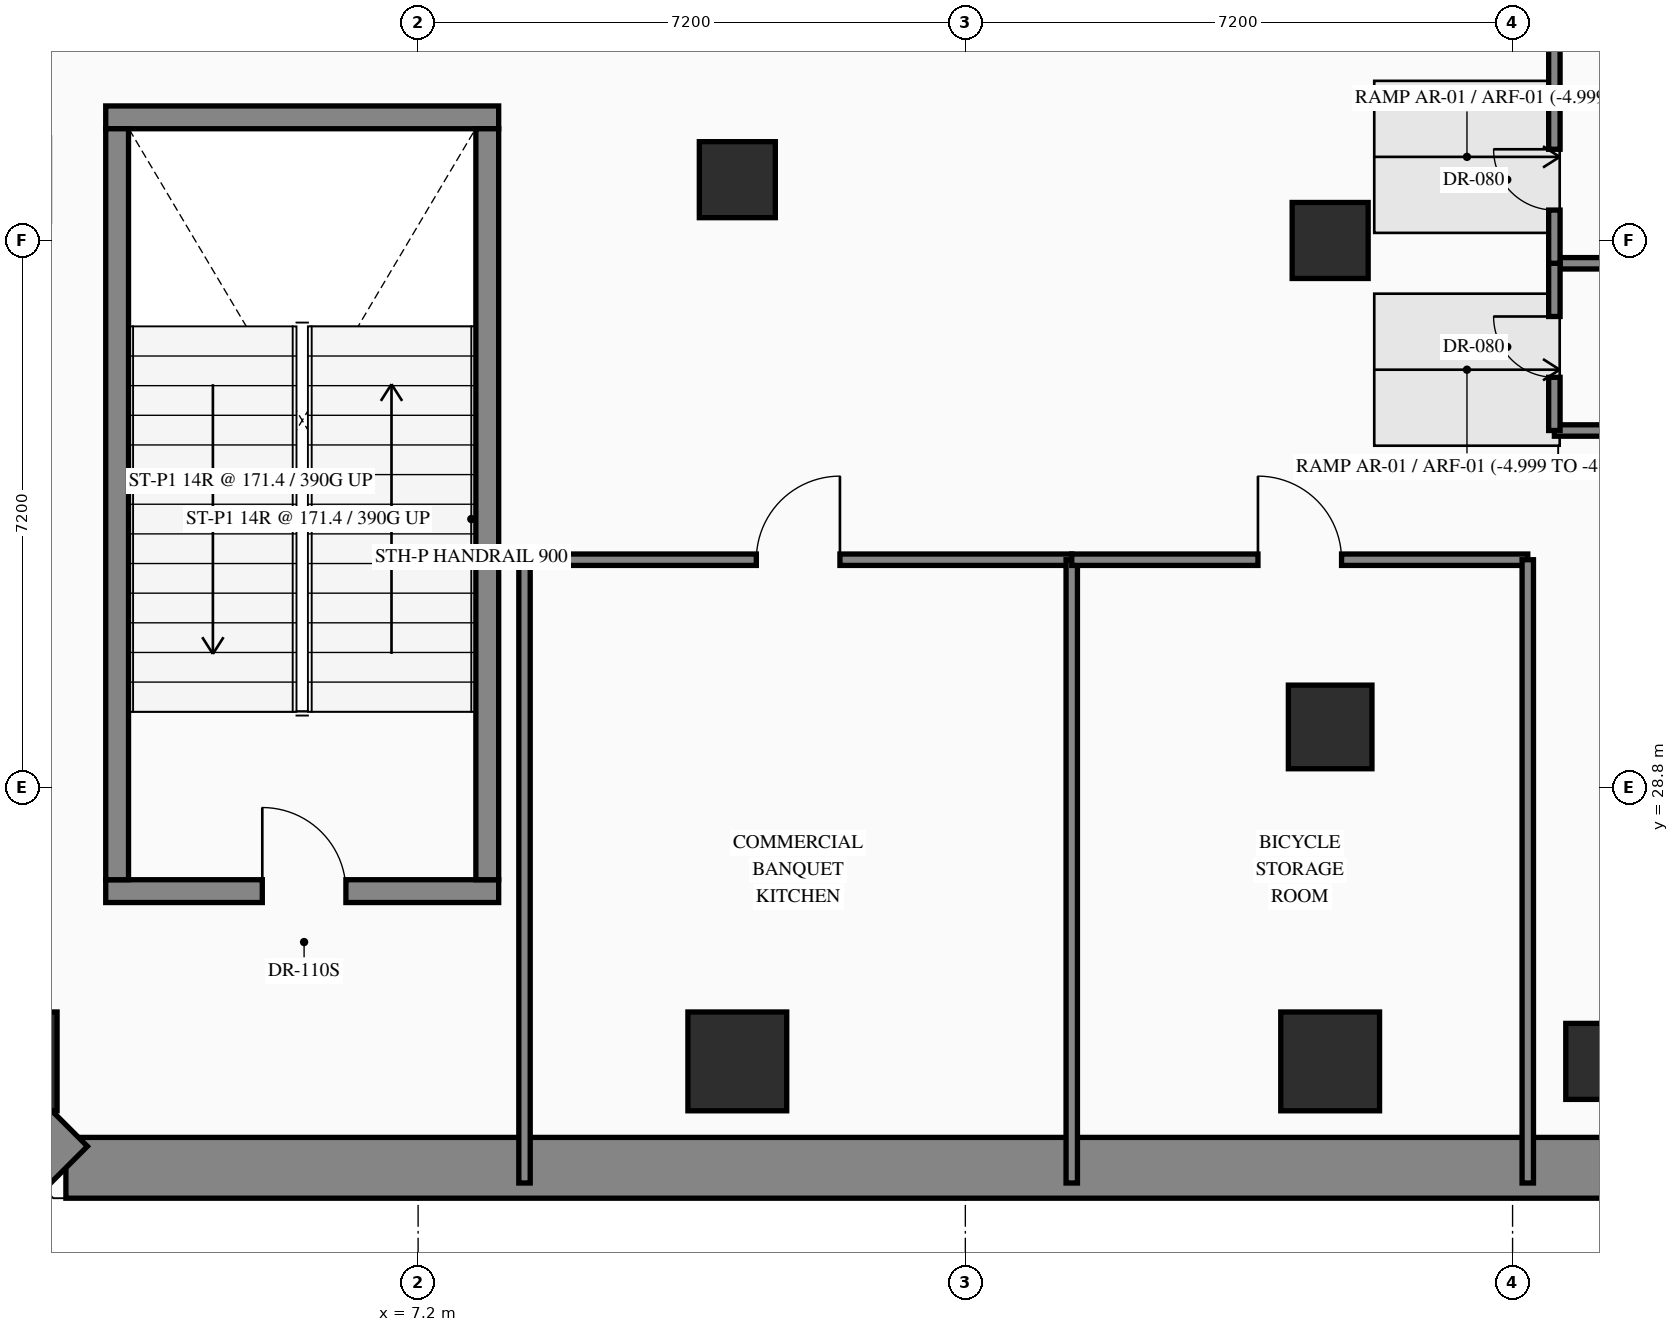
"""IFC4 building model, lengths in metres.
Left out: names, types, materials, properties, quantities, classifications, styles, units other than length and angle.
Written with IfcOpenShell. Run it as: python <this file> out.ifc"""

import sys

from ifc_helpers import new_model, si_unit, direction, frame, frame_2d, origin, origin_2d, place, context, subcontext, project, spatial, rectangle, hollow_rectangle, extrude, element, fill, save


model = new_model("IFC4")
c1 = context("Model", 3, precision=1e-05, world=origin(), true_north=direction((0.0, 1.0)))
c2 = subcontext(c1, "Body", "Model", "MODEL_VIEW")
j1 = project(units=[si_unit("LENGTHUNIT", "METRE"), si_unit("PLANEANGLEUNIT", "RADIAN")], contexts=[c1])
p1 = place(None, origin())
s1 = spatial("IfcSite", under=j1, at=p1, CompositionType="ELEMENT")
p2 = place(p1, origin())
s2 = spatial("IfcBuilding", under=s1, at=p2, CompositionType="ELEMENT")
p3 = place(p2, frame((0.0, 0.0, -4.8)))
s3 = spatial("IfcBuildingStorey", under=s2, at=p3, CompositionType="ELEMENT", Elevation=-4.8)
p4 = place(p3, frame((3.09, 27.44, 0.0), z_axis=(0.0, 0.0, 1.0), x_axis=(1.0, 0.0, 0.0)))
e1 = element("IfcWall", 1, at=p4, inside=s3, PredefinedType="SHEAR", context=c2, shape_type="SweptSolid", body=[
    extrude(rectangle(XDim=5.17, YDim=0.3, at=frame_2d((2.585, 0.0))), origin(), (0.0, 0.0, 1.0), 4.8),
])
p5 = place(p4, frame((2.06, 0.0, 0.0)))
e2 = element("IfcOpeningElement", 2, at=p5, cuts=e1, PredefinedType="OPENING", context=c2, shape_type="SweptSolid", body=[
    extrude(rectangle(XDim=1.1, YDim=2.2, at=frame_2d((0.55, 1.1))), frame((0.0, 0.16, 0.0), z_axis=(0.0, -1.0, 0.0), x_axis=(1.0, 0.0, 0.0)), (0.0, 0.0, 1.0), 0.32),
])
p6 = place(p3, frame((3.09, 37.62, 0.0), z_axis=(0.0, 0.0, 1.0), x_axis=(1.0, 0.0, 0.0)))
e3 = element("IfcWall", 3, at=p6, inside=s3, PredefinedType="SHEAR", context=c2, shape_type="SweptSolid", body=[
    extrude(rectangle(XDim=5.17, YDim=0.3, at=frame_2d((2.585, 0.0))), origin(), (0.0, 0.0, 1.0), 4.8),
])
for number, where, z_axis, x_axis in (
    (4, (3.24, 27.59, 0.0), (0.0, 0.0, 1.0), (0.0, 1.0, 0.0)),
    (5, (8.11, 27.59, 0.0), (0.0, 0.0, 1.0), (0.0, 1.0, 0.0)),
):
    element("IfcWall", number, at=place(p3, frame(where, z_axis=z_axis, x_axis=x_axis)), inside=s3, PredefinedType="SHEAR", context=c2, shape_type="SweptSolid", body=[
        extrude(rectangle(XDim=9.88, YDim=0.3, at=frame_2d((4.94, 0.0))), origin(), (0.0, 0.0, 1.0), 4.8),
    ])
p7 = place(p3, frame((25.333, 23.8, 0.0), z_axis=(0.0, 0.0, 1.0), x_axis=(-1.0, 0.0, 0.0)))
e6 = element("IfcWall", 6, at=p7, inside=s3, PredefinedType="SHEAR", context=c2, shape_type="SweptSolid", body=[
    extrude(rectangle(XDim=22.767, YDim=0.8, at=frame_2d((11.384, 0.0))), origin(), (0.0, 0.0, 1.0), 4.5),
])
p8 = place(p3, frame((2.566, 23.8, 0.0), z_axis=(0.0, 0.0, 1.0), x_axis=(-0.707106781187, 0.707106781187, 0.0)))
e7 = element("IfcWall", 7, at=p8, inside=s3, PredefinedType="SHEAR", context=c2, shape_type="SweptSolid", body=[
    extrude(rectangle(XDim=3.063, YDim=0.8, at=frame_2d((1.532, 0.0))), origin(), (0.0, 0.0, 1.0), 4.5),
])
for number, where, z_axis, x_axis in (
    (8, (1.8, 25.2, 0.0), (0.0, 0.0, 1.0), (1.0, 0.0, 0.0)),
    (9, (11.4, 25.2, 0.0), (0.0, 0.0, 1.0), (1.0, 0.0, 0.0)),
    (10, (19.2, 25.2, 0.0), (0.0, 0.0, 1.0), (1.0, 0.0, 0.0)),
):
    element("IfcColumn", number, at=place(p3, frame(where, z_axis=z_axis, x_axis=x_axis)), inside=s3, PredefinedType="COLUMN", context=c2, shape_type="SweptSolid", body=[
        extrude(rectangle(XDim=1.3, YDim=1.3, at=origin_2d()), origin(), (0.0, 0.0, 1.0), 4.8),
    ])
p9 = place(p3, frame((19.2, 29.6, 0.0), z_axis=(0.0, 0.0, 1.0), x_axis=(1.0, 0.0, 0.0)))
e11 = element("IfcColumn", 11, at=p9, inside=s3, PredefinedType="COLUMN", context=c2, shape_type="SweptSolid", body=[
    extrude(hollow_rectangle(XDim=1.1, YDim=1.1, WallThickness=0.04, at=origin_2d()), origin(), (0.0, 0.0, 1.0), 4.8),
])
p10 = place(p3, frame((22.8, 25.2, 0.0), z_axis=(0.0, 0.0, 1.0), x_axis=(1.0, 0.0, 0.0)))
e12 = element("IfcColumn", 12, at=p10, inside=s3, PredefinedType="COLUMN", context=c2, shape_type="SweptSolid", body=[
    extrude(hollow_rectangle(XDim=1.0, YDim=1.0, WallThickness=0.038, at=origin_2d()), origin(), (0.0, 0.0, 1.0), 4.8),
])
for number, where, z_axis, x_axis in (
    (13, (11.4, 36.8, 0.0), (0.0, 0.0, 1.0), (1.0, 0.0, 0.0)),
    (14, (19.2, 36.0, 0.0), (0.0, 0.0, 1.0), (1.0, 0.0, 0.0)),
):
    element("IfcColumn", number, at=place(p3, frame(where, z_axis=z_axis, x_axis=x_axis)), inside=s3, PredefinedType="COLUMN", context=c2, shape_type="SweptSolid", body=[
        extrude(hollow_rectangle(XDim=1.0, YDim=1.0, WallThickness=0.038, at=origin_2d()), origin(), (0.0, 0.0, 1.0), 4.468),
    ])
for number, where, z_axis, x_axis in (
    (15, (22.15, 33.5, 0.0), (0.0, 0.0, 1.0), (1.0, 0.0, 0.0)),
    (16, (22.15, 35.7, 0.0), (0.0, 0.0, 1.0), (1.0, 0.0, 0.0)),
    (17, (22.15, 37.9, 0.0), (0.0, 0.0, 1.0), (1.0, 0.0, 0.0)),
):
    element("IfcWall", number, at=place(p3, frame(where, z_axis=z_axis, x_axis=x_axis)), inside=s3, PredefinedType="PARTITIONING", context=c2, shape_type="SweptSolid", body=[
        extrude(rectangle(XDim=3.3, YDim=0.15, at=frame_2d((1.65, 0.0))), origin(), (0.0, 0.0, 1.0), 4.5),
    ])
p11 = place(p3, frame((22.15, 33.5, 0.0), z_axis=(0.0, 0.0, 1.0), x_axis=(0.0, 1.0, 0.0)))
e18 = element("IfcWall", 18, at=p11, inside=s3, PredefinedType="PARTITIONING", context=c2, shape_type="SweptSolid", body=[
    extrude(rectangle(XDim=2.2, YDim=0.15, at=frame_2d((1.1, 0.0))), origin(), (0.0, 0.0, 1.0), 4.5),
])
p12 = place(p11, frame((0.7, 0.0, 0.0)))
e19 = element("IfcOpeningElement", 19, at=p12, cuts=e18, PredefinedType="OPENING", context=c2, shape_type="SweptSolid", body=[
    extrude(rectangle(XDim=0.8, YDim=2.06, at=frame_2d((0.4, 1.03))), frame((0.0, 0.085, 0.0), z_axis=(0.0, -1.0, 0.0), x_axis=(1.0, 0.0, 0.0)), (0.0, 0.0, 1.0), 0.17),
])
p13 = place(p3, frame((22.15, 35.7, 0.0), z_axis=(0.0, 0.0, 1.0), x_axis=(0.0, 1.0, 0.0)))
e20 = element("IfcWall", 20, at=p13, inside=s3, PredefinedType="PARTITIONING", context=c2, shape_type="SweptSolid", body=[
    extrude(rectangle(XDim=2.2, YDim=0.15, at=frame_2d((1.1, 0.0))), origin(), (0.0, 0.0, 1.0), 4.5),
])
p14 = place(p13, frame((0.7, 0.0, 0.0)))
e21 = element("IfcOpeningElement", 21, at=p14, cuts=e20, PredefinedType="OPENING", context=c2, shape_type="SweptSolid", body=[
    extrude(rectangle(XDim=0.8, YDim=2.06, at=frame_2d((0.4, 1.03))), frame((0.0, 0.085, 0.0), z_axis=(0.0, -1.0, 0.0), x_axis=(1.0, 0.0, 0.0)), (0.0, 0.0, 1.0), 0.17),
])
p15 = place(p3, frame((22.15, 37.9, 0.0), z_axis=(0.0, 0.0, 1.0), x_axis=(0.0, 1.0, 0.0)))
e22 = element("IfcWall", 22, at=p15, inside=s3, PredefinedType="PARTITIONING", context=c2, shape_type="SweptSolid", body=[
    extrude(rectangle(XDim=2.13, YDim=0.15, at=frame_2d((1.065, 0.0))), origin(), (0.0, 0.0, 1.0), 4.5),
])
p16 = place(p15, frame((0.665, 0.0, 0.0)))
e23 = element("IfcOpeningElement", 23, at=p16, cuts=e22, PredefinedType="OPENING", context=c2, shape_type="SweptSolid", body=[
    extrude(rectangle(XDim=0.8, YDim=2.06, at=frame_2d((0.4, 1.03))), frame((0.0, 0.085, 0.0), z_axis=(0.0, -1.0, 0.0), x_axis=(1.0, 0.0, 0.0)), (0.0, 0.0, 1.0), 0.17),
])
p17 = place(p3, frame((8.6, 31.8, 0.0), z_axis=(0.0, 0.0, 1.0), x_axis=(1.0, 0.0, 0.0)))
e24 = element("IfcWall", 24, at=p17, inside=s3, PredefinedType="PARTITIONING", context=c2, shape_type="SweptSolid", body=[
    extrude(rectangle(XDim=7.2, YDim=0.15, at=frame_2d((3.6, 0.0))), origin(), (0.0, 0.0, 1.0), 4.5),
])
p18 = place(p17, frame((3.05, 0.0, 0.0)))
e25 = element("IfcOpeningElement", 25, at=p18, cuts=e24, PredefinedType="OPENING", context=c2, shape_type="SweptSolid", body=[
    extrude(rectangle(XDim=1.1, YDim=2.24, at=frame_2d((0.55, 1.12))), frame((0.0, 0.085, 0.0), z_axis=(0.0, -1.0, 0.0), x_axis=(1.0, 0.0, 0.0)), (0.0, 0.0, 1.0), 0.17),
])
for number, where, z_axis, x_axis in (
    (26, (8.6, 23.6, 0.0), (0.0, 0.0, 1.0), (0.0, 1.0, 0.0)),
    (27, (15.8, 23.6, 0.0), (0.0, 0.0, 1.0), (0.0, 1.0, 0.0)),
):
    element("IfcWall", number, at=place(p3, frame(where, z_axis=z_axis, x_axis=x_axis)), inside=s3, PredefinedType="PARTITIONING", context=c2, shape_type="SweptSolid", body=[
        extrude(rectangle(XDim=8.2, YDim=0.15, at=frame_2d((4.1, 0.0))), origin(), (0.0, 0.0, 1.0), 4.5),
    ])
p19 = place(p3, frame((15.8, 31.8, 0.0), z_axis=(0.0, 0.0, 1.0), x_axis=(1.0, 0.0, 0.0)))
e28 = element("IfcWall", 28, at=p19, inside=s3, PredefinedType="PARTITIONING", context=c2, shape_type="SweptSolid", body=[
    extrude(rectangle(XDim=6.0, YDim=0.15, at=frame_2d((3.0, 0.0))), origin(), (0.0, 0.0, 1.0), 4.5),
])
p20 = place(p19, frame((2.45, 0.0, 0.0)))
e29 = element("IfcOpeningElement", 29, at=p20, cuts=e28, PredefinedType="OPENING", context=c2, shape_type="SweptSolid", body=[
    extrude(rectangle(XDim=1.1, YDim=2.24, at=frame_2d((0.55, 1.12))), frame((0.0, 0.085, 0.0), z_axis=(0.0, -1.0, 0.0), x_axis=(1.0, 0.0, 0.0)), (0.0, 0.0, 1.0), 0.17),
])
p21 = place(p3, frame((21.8, 23.6, 0.0), z_axis=(0.0, 0.0, 1.0), x_axis=(0.0, 1.0, 0.0)))
e30 = element("IfcWall", 30, at=p21, inside=s3, PredefinedType="PARTITIONING", context=c2, shape_type="SweptSolid", body=[
    extrude(rectangle(XDim=8.2, YDim=0.15, at=frame_2d((4.1, 0.0))), origin(), (0.0, 0.0, 1.0), 4.5),
])
p22 = place(p5, origin())
e31 = element("IfcDoor", 31, at=p22, inside=s3, OperationType="SINGLE_SWING_LEFT", PredefinedType="DOOR", context=c2, shape_type="SweptSolid", body=[
    extrude(rectangle(XDim=1.1, YDim=2.2, at=frame_2d((0.55, 1.1))), frame((0.0, 0.025, 0.0), z_axis=(0.0, -1.0, 0.0), x_axis=(1.0, 0.0, 0.0)), (0.0, 0.0, 1.0), 0.05),
])
fill(e2, e31)
p23 = place(p12, origin())
e32 = element("IfcDoor", 32, at=p23, inside=s3, OperationType="SINGLE_SWING_RIGHT", PredefinedType="DOOR", context=c2, shape_type="SweptSolid", body=[
    extrude(rectangle(XDim=0.8, YDim=2.06, at=frame_2d((0.4, 1.03))), frame((0.0, 0.025, 0.0), z_axis=(0.0, -1.0, 0.0), x_axis=(1.0, 0.0, 0.0)), (0.0, 0.0, 1.0), 0.05),
])
fill(e19, e32)
p24 = place(p14, origin())
e33 = element("IfcDoor", 33, at=p24, inside=s3, OperationType="SINGLE_SWING_RIGHT", PredefinedType="DOOR", context=c2, shape_type="SweptSolid", body=[
    extrude(rectangle(XDim=0.8, YDim=2.06, at=frame_2d((0.4, 1.03))), frame((0.0, 0.025, 0.0), z_axis=(0.0, -1.0, 0.0), x_axis=(1.0, 0.0, 0.0)), (0.0, 0.0, 1.0), 0.05),
])
fill(e21, e33)
p25 = place(p18, origin())
e34 = element("IfcDoor", 34, at=p25, inside=s3, OperationType="SINGLE_SWING_RIGHT", PredefinedType="DOOR", context=c2, shape_type="SweptSolid", body=[
    extrude(rectangle(XDim=1.1, YDim=2.24, at=frame_2d((0.55, 1.12))), frame((0.0, 0.025, 0.0), z_axis=(0.0, -1.0, 0.0), x_axis=(1.0, 0.0, 0.0)), (0.0, 0.0, 1.0), 0.05),
])
fill(e25, e34)
p26 = place(p20, origin())
e35 = element("IfcDoor", 35, at=p26, inside=s3, OperationType="SINGLE_SWING_LEFT", PredefinedType="DOOR", context=c2, shape_type="SweptSolid", body=[
    extrude(rectangle(XDim=1.1, YDim=2.24, at=frame_2d((0.55, 1.12))), frame((0.0, 0.025, 0.0), z_axis=(0.0, -1.0, 0.0), x_axis=(1.0, 0.0, 0.0)), (0.0, 0.0, 1.0), 0.05),
])
fill(e29, e35)
save(model, sys.argv[1])
